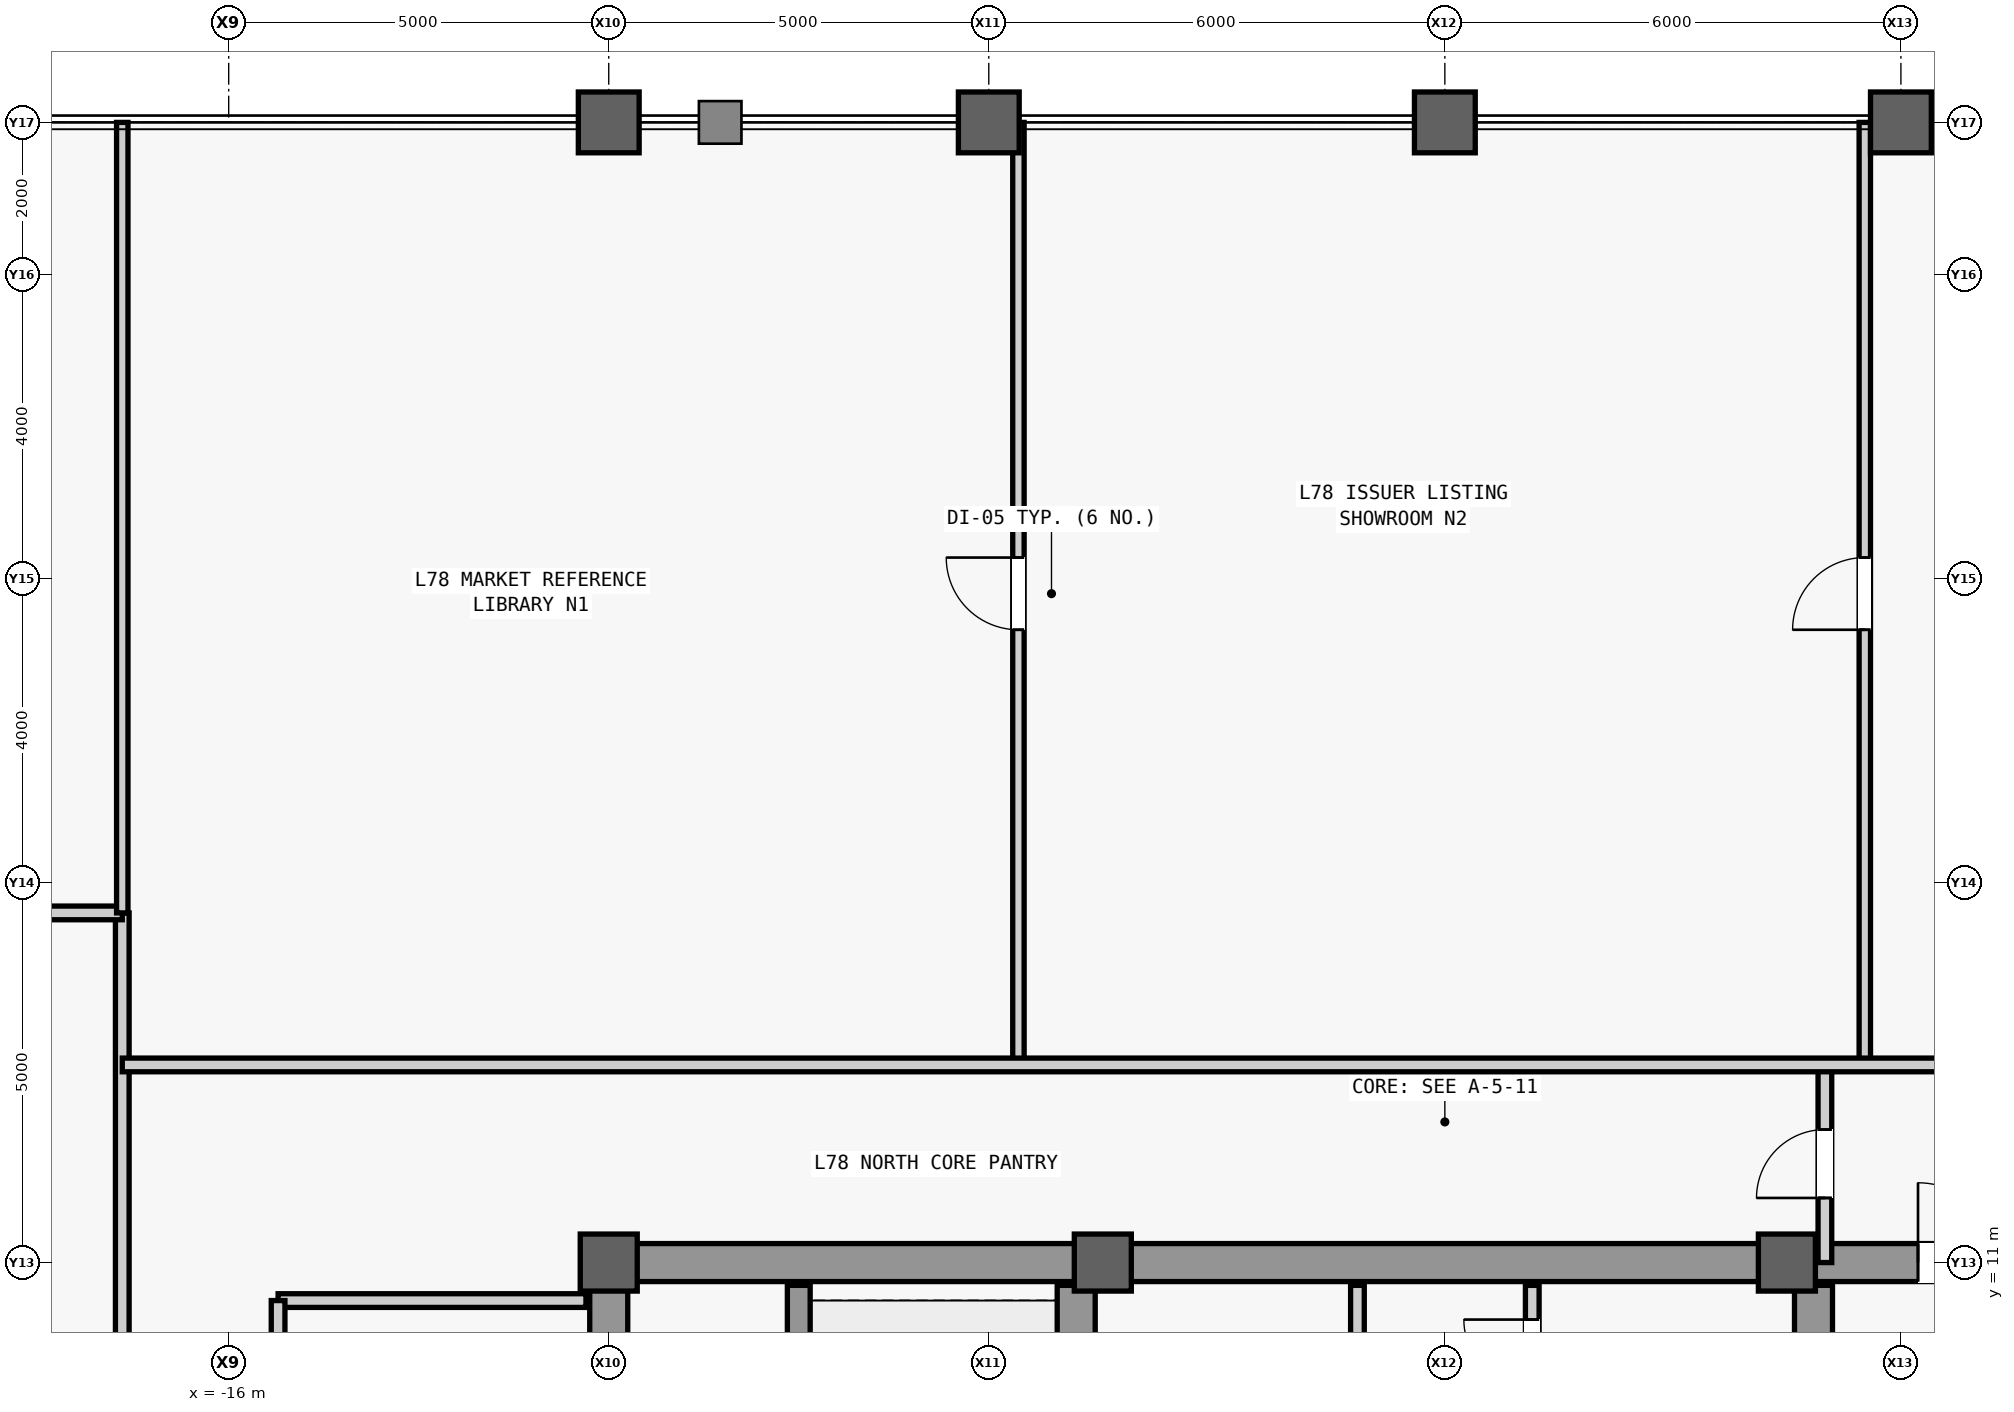
"""IFC4 building model, lengths in metres.
Left out: names, types, materials, properties, quantities, classifications, styles, units other than length and angle.
Written with IfcOpenShell. Run it as: python <this file> out.ifc"""

import sys

from ifc_helpers import new_model, si_unit, direction, frame, frame_2d, origin, origin_2d, place, context, subcontext, project, spatial, rectangle, hollow_rectangle, extrude, source, transform, mapped, element, fill, save


model = new_model("IFC4")
c1 = context("Model", 3, precision=1e-05, world=origin(), true_north=direction((0.0, 1.0)))
c2 = subcontext(c1, "Body", "Model", "MODEL_VIEW")
j1 = project(units=[si_unit("LENGTHUNIT", "METRE"), si_unit("PLANEANGLEUNIT", "RADIAN")], contexts=[c1])
p1 = place(None, origin())
s1 = spatial("IfcSite", under=j1, at=p1, CompositionType="ELEMENT")
p2 = place(p1, origin())
s2 = spatial("IfcBuilding", under=s1, at=p2, CompositionType="ELEMENT")
p3 = place(p2, frame((0.0, 0.0, 330.3)))
s3 = spatial("IfcBuildingStorey", under=s2, at=p3, CompositionType="ELEMENT", Elevation=330.3)
m1 = source(origin(), c2, "Body", "SweptSolid", [
    extrude(rectangle(XDim=22.0, YDim=0.5, at=frame_2d((11.0, 0.0))), origin(), (0.0, 0.0, 1.0), 3.74),
])
p4 = place(p3, frame((-11.0, -11.0, 0.0), z_axis=(0.0, 0.0, 1.0), x_axis=(0.0, 1.0, 0.0)))
e1 = element("IfcWall", 1, at=p4, inside=s3, PredefinedType="SHEAR", context=c2, shape_type="MappedRepresentation", body=[
    mapped(m1, transform((0.0, 0.0, 0.0), scale=1.0)),
])
m2 = source(origin(), c2, "Body", "SweptSolid", [
    extrude(rectangle(XDim=1.1, YDim=2.2, at=frame_2d((0.55, 1.1))), frame((0.0, 0.26, 0.0), z_axis=(0.0, -1.0, 0.0), x_axis=(1.0, 0.0, 0.0)), (0.0, 0.0, 1.0), 0.52),
])
p5 = place(p4, frame((0.8, 0.0, 0.0)))
e2 = element("IfcOpeningElement", 2, at=p5, cuts=e1, PredefinedType="OPENING", context=c2, shape_type="MappedRepresentation", body=[
    mapped(m2, transform((0.0, 0.0, 0.0), scale=1.0)),
])
p6 = place(p4, frame((12.5, 0.0, 0.0)))
e3 = element("IfcOpeningElement", 3, at=p6, cuts=e1, PredefinedType="OPENING", context=c2, shape_type="MappedRepresentation", body=[
    mapped(m2, transform((0.0, 0.0, 0.0), scale=1.0)),
])
m3 = source(origin(), c2, "Body", "SweptSolid", [
    extrude(rectangle(XDim=0.9, YDim=2.15, at=frame_2d((0.45, 1.075))), frame((0.0, 0.26, 0.0), z_axis=(0.0, -1.0, 0.0), x_axis=(1.0, 0.0, 0.0)), (0.0, 0.0, 1.0), 0.52),
])
p7 = place(p4, frame((6.85, 0.0, 0.0)))
e4 = element("IfcOpeningElement", 4, at=p7, cuts=e1, PredefinedType="OPENING", context=c2, shape_type="MappedRepresentation", body=[
    mapped(m3, transform((0.0, 0.0, 0.0), scale=1.0)),
])
m4 = source(origin(), c2, "Body", "SweptSolid", [
    extrude(rectangle(XDim=1.2, YDim=2.3, at=frame_2d((0.6, 1.15))), frame((0.0, 0.26, 0.0), z_axis=(0.0, -1.0, 0.0), x_axis=(1.0, 0.0, 0.0)), (0.0, 0.0, 1.0), 0.52),
])
p8 = place(p4, frame((14.6, 0.0, 0.0)))
e5 = element("IfcOpeningElement", 5, at=p8, cuts=e1, PredefinedType="OPENING", context=c2, shape_type="MappedRepresentation", body=[
    mapped(m4, transform((0.0, 0.0, 0.0), scale=1.0)),
])
p9 = place(p4, frame((18.2, 0.0, 0.0)))
e6 = element("IfcOpeningElement", 6, at=p9, cuts=e1, PredefinedType="OPENING", context=c2, shape_type="MappedRepresentation", body=[
    mapped(m4, transform((0.0, 0.0, 0.0), scale=1.0)),
])
m5 = source(origin(), c2, "Body", "SweptSolid", [
    extrude(rectangle(XDim=1.3, YDim=2.3, at=frame_2d((0.65, 1.15))), frame((0.0, 0.26, 0.0), z_axis=(0.0, -1.0, 0.0), x_axis=(1.0, 0.0, 0.0)), (0.0, 0.0, 1.0), 0.52),
])
p10 = place(p4, frame((2.7, 0.0, 0.0)))
e7 = element("IfcOpeningElement", 7, at=p10, cuts=e1, PredefinedType="OPENING", context=c2, shape_type="MappedRepresentation", body=[
    mapped(m5, transform((0.0, 0.0, 0.0), scale=1.0)),
])
m6 = source(origin(), c2, "Body", "SweptSolid", [
    extrude(rectangle(XDim=21.4, YDim=0.5, at=frame_2d((10.7, 0.0))), origin(), (0.0, 0.0, 1.0), 3.74),
])
for number, where, z_axis, x_axis in (
    (8, (-4.85, -10.7, 0.0), (0.0, 0.0, 1.0), (0.0, 1.0, 0.0)),
    (9, (4.85, -10.7, 0.0), (0.0, 0.0, 1.0), (0.0, 1.0, 0.0)),
):
    element("IfcWall", number, at=place(p3, frame(where, z_axis=z_axis, x_axis=x_axis)), inside=s3, PredefinedType="SHEAR", context=c2, shape_type="MappedRepresentation", body=[
        mapped(m6, transform((0.0, 0.0, 0.0), scale=1.0)),
    ])
m7 = source(origin(), c2, "Body", "SweptSolid", [
    extrude(rectangle(XDim=5.9, YDim=0.5, at=frame_2d((2.95, 0.0))), origin(), (0.0, 0.0, 1.0), 3.74),
])
p11 = place(p3, frame((-10.75, 11.0, 0.0), z_axis=(0.0, 0.0, 1.0), x_axis=(1.0, 0.0, 0.0)))
e10 = element("IfcWall", 10, at=p11, inside=s3, PredefinedType="SHEAR", context=c2, shape_type="MappedRepresentation", body=[
    mapped(m7, transform((0.0, 0.0, 0.0), scale=1.0)),
])
p12 = place(p3, frame((4.85, 11.0, 0.0), z_axis=(0.0, 0.0, 1.0), x_axis=(1.0, 0.0, 0.0)))
e11 = element("IfcWall", 11, at=p12, inside=s3, PredefinedType="SHEAR", context=c2, shape_type="MappedRepresentation", body=[
    mapped(m7, transform((0.0, 0.0, 0.0), scale=1.0)),
])
m8 = source(origin(), c2, "Body", "SweptSolid", [
    extrude(rectangle(XDim=1.05, YDim=2.2, at=frame_2d((0.525, 1.1))), frame((0.0, 0.26, 0.0), z_axis=(0.0, -1.0, 0.0), x_axis=(1.0, 0.0, 0.0)), (0.0, 0.0, 1.0), 0.52),
])
p13 = place(p12, frame((1.375, 0.0, 0.0)))
e12 = element("IfcOpeningElement", 12, at=p13, cuts=e11, PredefinedType="OPENING", context=c2, shape_type="MappedRepresentation", body=[
    mapped(m8, transform((0.0, 0.0, 0.0), scale=1.0)),
])
m9 = source(origin(), c2, "Body", "SweptSolid", [
    extrude(rectangle(XDim=9.2, YDim=0.5, at=frame_2d((4.6, 0.0))), origin(), (0.0, 0.0, 1.0), 3.74),
])
p14 = place(p3, frame((-4.6, 11.0, 0.0), z_axis=(0.0, 0.0, 1.0), x_axis=(1.0, 0.0, 0.0)))
e13 = element("IfcWall", 13, at=p14, inside=s3, PredefinedType="SHEAR", context=c2, shape_type="MappedRepresentation", body=[
    mapped(m9, transform((0.0, 0.0, 0.0), scale=1.0)),
])
m10 = source(origin(), c2, "Body", "SweptSolid", [
    extrude(rectangle(XDim=0.75, YDim=0.75, at=origin_2d()), origin(), (0.0, 0.0, 1.0), 4.0),
])
p15 = place(p3, frame((-11.0, 11.0, 0.0), z_axis=(0.0, 0.0, 1.0), x_axis=(1.0, 0.0, 0.0)))
e14 = element("IfcColumn", 14, at=p15, inside=s3, PredefinedType="COLUMN", context=c2, shape_type="MappedRepresentation", body=[
    mapped(m10, transform((0.0, 0.0, 0.0), scale=1.0)),
])
m11 = source(origin(), c2, "Body", "SweptSolid", [
    extrude(hollow_rectangle(XDim=0.8, YDim=0.8, WallThickness=0.045, at=origin_2d()), origin(), (0.0, 0.0, 1.0), 4.0),
])
for number, where, z_axis, x_axis in (
    (15, (-11.0, 26.0, 0.0), (0.0, 0.0, 1.0), (1.0, 0.0, 0.0)),
    (16, (-6.0, 26.0, 0.0), (0.0, 0.0, 1.0), (1.0, 0.0, 0.0)),
):
    element("IfcColumn", number, at=place(p3, frame(where, z_axis=z_axis, x_axis=x_axis)), inside=s3, PredefinedType="COLUMN", context=c2, shape_type="MappedRepresentation", body=[
        mapped(m11, transform((0.0, 0.0, 0.0), scale=1.0)),
    ])
p16 = place(p3, frame((-4.5, 11.0, 0.0), z_axis=(0.0, 0.0, 1.0), x_axis=(1.0, 0.0, 0.0)))
e17 = element("IfcColumn", 17, at=p16, inside=s3, PredefinedType="COLUMN", context=c2, shape_type="MappedRepresentation", body=[
    mapped(m10, transform((0.0, 0.0, 0.0), scale=1.0)),
])
p17 = place(p3, frame((0.0, 26.0, 0.0), z_axis=(0.0, 0.0, 1.0), x_axis=(1.0, 0.0, 0.0)))
e18 = element("IfcColumn", 18, at=p17, inside=s3, PredefinedType="COLUMN", context=c2, shape_type="MappedRepresentation", body=[
    mapped(m11, transform((0.0, 0.0, 0.0), scale=1.0)),
])
p18 = place(p3, frame((4.5, 11.0, 0.0), z_axis=(0.0, 0.0, 1.0), x_axis=(1.0, 0.0, 0.0)))
e19 = element("IfcColumn", 19, at=p18, inside=s3, PredefinedType="COLUMN", context=c2, shape_type="MappedRepresentation", body=[
    mapped(m10, transform((0.0, 0.0, 0.0), scale=1.0)),
])
p19 = place(p3, frame((6.0, 26.0, 0.0), z_axis=(0.0, 0.0, 1.0), x_axis=(1.0, 0.0, 0.0)))
e20 = element("IfcColumn", 20, at=p19, inside=s3, PredefinedType="COLUMN", context=c2, shape_type="MappedRepresentation", body=[
    mapped(m11, transform((0.0, 0.0, 0.0), scale=1.0)),
])
m12 = source(origin(), c2, "Body", "SweptSolid", [
    extrude(rectangle(XDim=7.75, YDim=0.3, at=frame_2d((3.875, 0.0))), origin(), (0.0, 0.0, 1.0), 3.74),
])
p20 = place(p3, frame((-8.5, 2.95, 0.0), z_axis=(0.0, 0.0, 1.0), x_axis=(0.0, 1.0, 0.0)))
e21 = element("IfcWall", 21, at=p20, inside=s3, PredefinedType="SHEAR", context=c2, shape_type="MappedRepresentation", body=[
    mapped(m12, transform((0.0, 0.0, 0.0), scale=1.0)),
])
m13 = source(origin(), c2, "Body", "SweptSolid", [
    extrude(rectangle(XDim=4.05, YDim=0.18, at=frame_2d((2.025, 0.0))), origin(), (0.0, 0.0, 1.0), 3.74),
])
p21 = place(p3, frame((-15.35, 10.5, 0.0), z_axis=(0.0, 0.0, 1.0), x_axis=(1.0, 0.0, 0.0)))
e22 = element("IfcWall", 22, at=p21, inside=s3, PredefinedType="PARTITIONING", context=c2, shape_type="MappedRepresentation", body=[
    mapped(m13, transform((0.0, 0.0, 0.0), scale=1.0)),
])
m14 = source(origin(), c2, "Body", "SweptSolid", [
    extrude(rectangle(XDim=16.6, YDim=0.18, at=frame_2d((8.3, 0.0))), origin(), (0.0, 0.0, 1.0), 3.74),
])
p22 = place(p3, frame((-15.35, -6.1, 0.0), z_axis=(0.0, 0.0, 1.0), x_axis=(0.0, 1.0, 0.0)))
e23 = element("IfcWall", 23, at=p22, inside=s3, PredefinedType="PARTITIONING", context=c2, shape_type="MappedRepresentation", body=[
    mapped(m14, transform((0.0, 0.0, 0.0), scale=1.0)),
])
m15 = source(origin(), c2, "Body", "SweptSolid", [
    extrude(rectangle(XDim=1.8, YDim=2.25, at=frame_2d((0.9, 1.125))), frame((0.0, 0.1, 0.0), z_axis=(0.0, -1.0, 0.0), x_axis=(1.0, 0.0, 0.0)), (0.0, 0.0, 1.0), 0.2),
])
p23 = place(p22, frame((2.7, 0.0, 0.0)))
e24 = element("IfcOpeningElement", 24, at=p23, cuts=e23, PredefinedType="OPENING", context=c2, shape_type="MappedRepresentation", body=[
    mapped(m15, transform((0.0, 0.0, 0.0), scale=1.0)),
])
p24 = place(p22, frame((11.0, 0.0, 0.0)))
e25 = element("IfcOpeningElement", 25, at=p24, cuts=e23, PredefinedType="OPENING", context=c2, shape_type="MappedRepresentation", body=[
    mapped(m15, transform((0.0, 0.0, 0.0), scale=1.0)),
])
m16 = source(origin(), c2, "Body", "SweptSolid", [
    extrude(rectangle(XDim=5.4, YDim=0.18, at=frame_2d((2.7, 0.0))), origin(), (0.0, 0.0, 1.0), 3.74),
])
p25 = place(p3, frame((-1.15, 5.3, 0.0), z_axis=(0.0, 0.0, 1.0), x_axis=(0.0, 1.0, 0.0)))
e26 = element("IfcWall", 26, at=p25, inside=s3, PredefinedType="PARTITIONING", context=c2, shape_type="MappedRepresentation", body=[
    mapped(m16, transform((0.0, 0.0, 0.0), scale=1.0)),
])
m17 = source(origin(), c2, "Body", "SweptSolid", [
    extrude(rectangle(XDim=0.9, YDim=2.15, at=frame_2d((0.45, 1.075))), frame((0.0, 0.1, 0.0), z_axis=(0.0, -1.0, 0.0), x_axis=(1.0, 0.0, 0.0)), (0.0, 0.0, 1.0), 0.2),
])
p26 = place(p25, frame((2.25, 0.0, 0.0)))
e27 = element("IfcOpeningElement", 27, at=p26, cuts=e26, PredefinedType="OPENING", context=c2, shape_type="MappedRepresentation", body=[
    mapped(m17, transform((0.0, 0.0, 0.0), scale=1.0)),
])
p27 = place(p3, frame((1.15, 5.3, 0.0), z_axis=(0.0, 0.0, 1.0), x_axis=(0.0, 1.0, 0.0)))
e28 = element("IfcWall", 28, at=p27, inside=s3, PredefinedType="PARTITIONING", context=c2, shape_type="MappedRepresentation", body=[
    mapped(m16, transform((0.0, 0.0, 0.0), scale=1.0)),
])
p28 = place(p27, frame((0.45, 0.0, 0.0)))
e29 = element("IfcOpeningElement", 29, at=p28, cuts=e28, PredefinedType="OPENING", context=c2, shape_type="MappedRepresentation", body=[
    mapped(m17, transform((0.0, 0.0, 0.0), scale=1.0)),
])
p29 = place(p27, frame((2.25, 0.0, 0.0)))
e30 = element("IfcOpeningElement", 30, at=p29, cuts=e28, PredefinedType="OPENING", context=c2, shape_type="MappedRepresentation", body=[
    mapped(m17, transform((0.0, 0.0, 0.0), scale=1.0)),
])
p30 = place(p27, frame((4.05, 0.0, 0.0)))
e31 = element("IfcOpeningElement", 31, at=p30, cuts=e28, PredefinedType="OPENING", context=c2, shape_type="MappedRepresentation", body=[
    mapped(m17, transform((0.0, 0.0, 0.0), scale=1.0)),
])
m18 = source(origin(), c2, "Body", "SweptSolid", [
    extrude(rectangle(XDim=8.4, YDim=0.18, at=frame_2d((4.2, 0.0))), origin(), (0.0, 0.0, 1.0), 3.74),
])
p31 = place(p3, frame((-17.4, 7.2, 0.0), z_axis=(0.0, 0.0, 1.0), x_axis=(0.0, 1.0, 0.0)))
e32 = element("IfcWall", 32, at=p31, inside=s3, PredefinedType="PARTITIONING", context=c2, shape_type="MappedRepresentation", body=[
    mapped(m18, transform((0.0, 0.0, 0.0), scale=1.0)),
])
m19 = source(origin(), c2, "Body", "SweptSolid", [
    extrude(rectangle(XDim=2.6, YDim=0.18, at=frame_2d((1.3, 0.0))), origin(), (0.0, 0.0, 1.0), 3.74),
])
p32 = place(p3, frame((5.0, 11.0, 0.0), z_axis=(0.0, 0.0, 1.0), x_axis=(0.0, 1.0, 0.0)))
e33 = element("IfcWall", 33, at=p32, inside=s3, PredefinedType="PARTITIONING", context=c2, shape_type="MappedRepresentation", body=[
    mapped(m19, transform((0.0, 0.0, 0.0), scale=1.0)),
])
p33 = place(p32, frame((0.85, 0.0, 0.0)))
e34 = element("IfcOpeningElement", 34, at=p33, cuts=e33, PredefinedType="OPENING", context=c2, shape_type="MappedRepresentation", body=[
    mapped(m17, transform((0.0, 0.0, 0.0), scale=1.0)),
])
m20 = source(origin(), c2, "Body", "SweptSolid", [
    extrude(rectangle(XDim=1.15, YDim=0.18, at=frame_2d((0.575, 0.0))), origin(), (0.0, 0.0, 1.0), 3.74),
])
p34 = place(p3, frame((-18.55, 15.6, 0.0), z_axis=(0.0, 0.0, 1.0), x_axis=(1.0, 0.0, 0.0)))
e35 = element("IfcWall", 35, at=p34, inside=s3, PredefinedType="PARTITIONING", context=c2, shape_type="MappedRepresentation", body=[
    mapped(m20, transform((0.0, 0.0, 0.0), scale=1.0)),
])
m21 = source(origin(), c2, "Body", "SweptSolid", [
    extrude(rectangle(XDim=12.4, YDim=0.15, at=frame_2d((6.2, 0.0))), origin(), (0.0, 0.0, 1.0), 3.74),
])
p35 = place(p3, frame((-5.61, 13.6, 0.0), z_axis=(0.0, 0.0, 1.0), x_axis=(0.0, 1.0, 0.0)))
e36 = element("IfcWall", 36, at=p35, inside=s3, PredefinedType="PARTITIONING", context=c2, shape_type="MappedRepresentation", body=[
    mapped(m21, transform((0.0, 0.0, 0.0), scale=1.0)),
])
m22 = source(origin(), c2, "Body", "SweptSolid", [
    extrude(rectangle(XDim=0.95, YDim=2.15, at=frame_2d((0.475, 1.075))), frame((0.0, 0.085, 0.0), z_axis=(0.0, -1.0, 0.0), x_axis=(1.0, 0.0, 0.0)), (0.0, 0.0, 1.0), 0.17),
])
p36 = place(p35, frame((5.725, 0.0, 0.0)))
e37 = element("IfcOpeningElement", 37, at=p36, cuts=e36, PredefinedType="OPENING", context=c2, shape_type="MappedRepresentation", body=[
    mapped(m22, transform((0.0, 0.0, 0.0), scale=1.0)),
])
p37 = place(p3, frame((5.525, 13.6, 0.0), z_axis=(0.0, 0.0, 1.0), x_axis=(0.0, 1.0, 0.0)))
e38 = element("IfcWall", 38, at=p37, inside=s3, PredefinedType="PARTITIONING", context=c2, shape_type="MappedRepresentation", body=[
    mapped(m21, transform((0.0, 0.0, 0.0), scale=1.0)),
])
p38 = place(p37, frame((5.725, 0.0, 0.0)))
e39 = element("IfcOpeningElement", 39, at=p38, cuts=e38, PredefinedType="OPENING", context=c2, shape_type="MappedRepresentation", body=[
    mapped(m22, transform((0.0, 0.0, 0.0), scale=1.0)),
])
m23 = source(origin(), c2, "Body", "SweptSolid", [
    extrude(rectangle(XDim=32.75, YDim=0.18, at=frame_2d((16.375, 0.0))), origin(), (0.0, 0.0, 1.0), 3.74),
])
p39 = place(p3, frame((-17.4, 13.6, 0.0), z_axis=(0.0, 0.0, 1.0), x_axis=(1.0, 0.0, 0.0)))
e40 = element("IfcWall", 40, at=p39, inside=s3, PredefinedType="PARTITIONING", context=c2, shape_type="MappedRepresentation", body=[
    mapped(m23, transform((0.0, 0.0, 0.0), scale=1.0)),
])
m24 = source(origin(), c2, "Body", "SweptSolid", [
    extrude(rectangle(XDim=1.05, YDim=2.2, at=frame_2d((0.525, 1.1))), frame((0.0, 0.1, 0.0), z_axis=(0.0, -1.0, 0.0), x_axis=(1.0, 0.0, 0.0)), (0.0, 0.0, 1.0), 0.2),
])
p40 = place(p39, frame((27.075, 0.0, 0.0)))
e41 = element("IfcOpeningElement", 41, at=p40, cuts=e40, PredefinedType="OPENING", context=c2, shape_type="MappedRepresentation", body=[
    mapped(m24, transform((0.0, 0.0, 0.0), scale=1.0)),
])
m25 = source(origin(), c2, "Body", "SweptSolid", [
    extrude(rectangle(XDim=10.4, YDim=0.15, at=frame_2d((5.2, 0.0))), origin(), (0.0, 0.0, 1.0), 3.74),
])
p41 = place(p3, frame((-17.4, 15.6, 0.0), z_axis=(0.0, 0.0, 1.0), x_axis=(0.0, 1.0, 0.0)))
e42 = element("IfcWall", 42, at=p41, inside=s3, PredefinedType="PARTITIONING", context=c2, shape_type="MappedRepresentation", body=[
    mapped(m25, transform((0.0, 0.0, 0.0), scale=1.0)),
])
m26 = source(origin(), c2, "Body", "SweptSolid", [
    extrude(rectangle(XDim=1.05, YDim=2.2, at=frame_2d((0.525, 1.1))), frame((0.0, 0.025, 0.0), z_axis=(0.0, -1.0, 0.0), x_axis=(1.0, 0.0, 0.0)), (0.0, 0.0, 1.0), 0.05),
])
p42 = place(p13, origin())
e43 = element("IfcDoor", 43, at=p42, inside=s3, OperationType="SINGLE_SWING_LEFT", PredefinedType="DOOR", context=c2, shape_type="MappedRepresentation", body=[
    mapped(m26, transform((0.0, 0.0, 0.0), scale=1.0)),
])
fill(e12, e43)
m27 = source(origin(), c2, "Body", "SweptSolid", [
    extrude(rectangle(XDim=0.9, YDim=2.15, at=frame_2d((0.45, 1.075))), frame((0.0, 0.025, 0.0), z_axis=(0.0, -1.0, 0.0), x_axis=(1.0, 0.0, 0.0)), (0.0, 0.0, 1.0), 0.05),
])
p43 = place(p30, origin())
e44 = element("IfcDoor", 44, at=p43, inside=s3, OperationType="SINGLE_SWING_RIGHT", PredefinedType="DOOR", context=c2, shape_type="MappedRepresentation", body=[
    mapped(m27, transform((0.0, 0.0, 0.0), scale=1.0)),
])
fill(e31, e44)
p44 = place(p33, origin())
e45 = element("IfcDoor", 45, at=p44, inside=s3, OperationType="SINGLE_SWING_LEFT", PredefinedType="DOOR", context=c2, shape_type="MappedRepresentation", body=[
    mapped(m27, transform((0.0, 0.0, 0.0), scale=1.0)),
])
fill(e34, e45)
m28 = source(origin(), c2, "Body", "SweptSolid", [
    extrude(rectangle(XDim=0.95, YDim=2.15, at=frame_2d((0.475, 1.075))), frame((0.0, 0.025, 0.0), z_axis=(0.0, -1.0, 0.0), x_axis=(1.0, 0.0, 0.0)), (0.0, 0.0, 1.0), 0.05),
])
p45 = place(p36, origin())
e46 = element("IfcDoor", 46, at=p45, inside=s3, OperationType="SINGLE_SWING_RIGHT", PredefinedType="DOOR", context=c2, shape_type="MappedRepresentation", body=[
    mapped(m28, transform((0.0, 0.0, 0.0), scale=1.0)),
])
fill(e37, e46)
p46 = place(p38, origin())
e47 = element("IfcDoor", 47, at=p46, inside=s3, OperationType="SINGLE_SWING_LEFT", PredefinedType="DOOR", context=c2, shape_type="MappedRepresentation", body=[
    mapped(m28, transform((0.0, 0.0, 0.0), scale=1.0)),
])
fill(e39, e47)
save(model, sys.argv[1])
